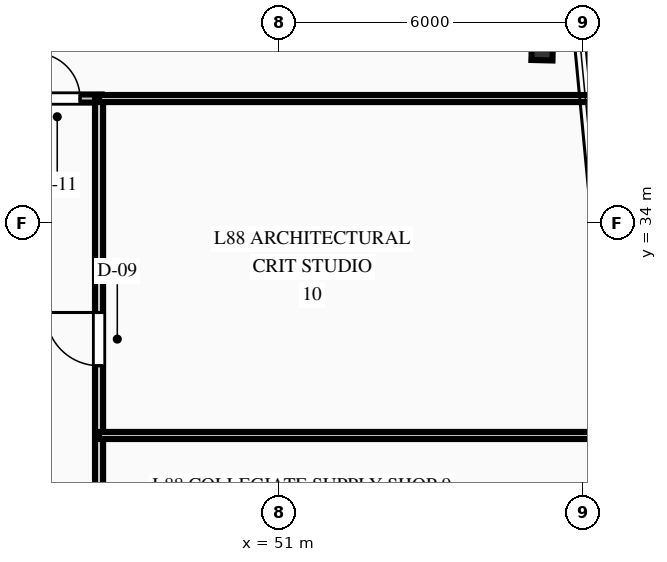
"""IFC4 building model, lengths in metres.
Left out: names, types, materials, properties, quantities, classifications, styles, units other than length and angle.
Written with IfcOpenShell. Run it as: python <this file> out.ifc"""

import sys

from ifc_helpers import new_model, si_unit, direction, frame, frame_2d, origin, origin_2d, place, context, subcontext, project, spatial, rectangle, i_section, extrude, element, fill, save


model = new_model("IFC4")
c1 = context("Model", 3, precision=1e-05, world=origin(), true_north=direction((0.0, 1.0)))
c2 = subcontext(c1, "Body", "Model", "MODEL_VIEW")
j1 = project(units=[si_unit("LENGTHUNIT", "METRE"), si_unit("PLANEANGLEUNIT", "RADIAN")], contexts=[c1])
p1 = place(None, origin())
s1 = spatial("IfcSite", under=j1, at=p1, CompositionType="ELEMENT")
p2 = place(p1, origin())
s2 = spatial("IfcBuilding", under=s1, at=p2, CompositionType="ELEMENT")
p3 = place(p2, frame((0.0, 0.0, 347.7)))
s3 = spatial("IfcBuildingStorey", under=s2, at=p3, CompositionType="ELEMENT", Elevation=347.7)
p4 = place(p3, frame((56.195, 37.409, 0.0), z_axis=(0.0, 0.0, 1.0), x_axis=(0.025304572866, 0.999679788028, 0.0)))
e1 = element("IfcColumn", 1, at=p4, inside=s3, PredefinedType="COLUMN", context=c2, shape_type="SweptSolid", body=[
    extrude(i_section(OverallWidth=0.406, OverallDepth=0.416, WebThickness=0.03, FlangeThickness=0.048, at=origin_2d()), origin(), (0.0, 0.0, 1.0), 4.5),
])
p5 = place(p3, frame((37.25, 36.45, 0.0), z_axis=(0.0, 0.0, 1.0), x_axis=(1.0, 0.0, 0.0)))
e2 = element("IfcWall", 2, at=p5, inside=s3, PredefinedType="PARTITIONING", context=c2, shape_type="SweptSolid", body=[
    extrude(rectangle(XDim=10.25, YDim=0.16, at=frame_2d((5.125, 0.0))), origin(), (0.0, 0.0, 1.0), 4.1),
])
p6 = place(p5, frame((4.365, 0.0, 0.0)))
e3 = element("IfcOpeningElement", 3, at=p6, cuts=e2, PredefinedType="OPENING", context=c2, shape_type="SweptSolid", body=[
    extrude(rectangle(XDim=1.05, YDim=2.15, at=frame_2d((0.525, 1.075))), frame((0.0, 0.09, 0.0), z_axis=(0.0, -1.0, 0.0), x_axis=(1.0, 0.0, 0.0)), (0.0, 0.0, 1.0), 0.18),
])
p7 = place(p5, frame((8.925, 0.0, 0.0)))
e4 = element("IfcOpeningElement", 4, at=p7, cuts=e2, PredefinedType="OPENING", context=c2, shape_type="SweptSolid", body=[
    extrude(rectangle(XDim=0.9, YDim=2.15, at=frame_2d((0.45, 1.075))), frame((0.0, 0.09, 0.0), z_axis=(0.0, -1.0, 0.0), x_axis=(1.0, 0.0, 0.0)), (0.0, 0.0, 1.0), 0.18),
])
p8 = place(p3, frame((47.45, 27.25, 0.0), z_axis=(0.0, 0.0, 1.0), x_axis=(0.0, 1.0, 0.0)))
e5 = element("IfcWall", 5, at=p8, inside=s3, PredefinedType="PARTITIONING", context=c2, shape_type="SweptSolid", body=[
    extrude(rectangle(XDim=9.2, YDim=0.16, at=frame_2d((4.6, 0.0))), origin(), (0.0, 0.0, 1.0), 4.1),
])
p9 = place(p8, frame((3.927, 0.0, 0.0)))
e6 = element("IfcOpeningElement", 6, at=p9, cuts=e5, PredefinedType="OPENING", context=c2, shape_type="SweptSolid", body=[
    extrude(rectangle(XDim=1.05, YDim=2.15, at=frame_2d((0.525, 1.075))), frame((0.0, 0.09, 0.0), z_axis=(0.0, -1.0, 0.0), x_axis=(1.0, 0.0, 0.0)), (0.0, 0.0, 1.0), 0.18),
])
p10 = place(p3, frame((47.45, 36.45, 0.0), z_axis=(0.0, 0.0, 1.0), x_axis=(1.0, 0.0, 0.0)))
e7 = element("IfcWall", 7, at=p10, inside=s3, PredefinedType="PARTITIONING", context=c2, shape_type="SweptSolid", body=[
    extrude(rectangle(XDim=9.738, YDim=0.14, at=frame_2d((4.869, 0.0))), origin(), (0.0, 0.0, 1.0), 3.478),
])
p11 = place(p3, frame((47.45, 29.8, 0.0), z_axis=(0.0, 0.0, 1.0), x_axis=(1.0, 0.0, 0.0)))
e8 = element("IfcWall", 8, at=p11, inside=s3, PredefinedType="PARTITIONING", context=c2, shape_type="SweptSolid", body=[
    extrude(rectangle(XDim=10.373, YDim=0.14, at=frame_2d((5.187, 0.0))), origin(), (0.0, 0.0, 1.0), 4.1),
])
p12 = place(p7, origin())
e9 = element("IfcDoor", 9, at=p12, inside=s3, OperationType="SINGLE_SWING_LEFT", PredefinedType="DOOR", context=c2, shape_type="SweptSolid", body=[
    extrude(rectangle(XDim=0.9, YDim=2.15, at=frame_2d((0.45, 1.075))), frame((0.0, 0.025, 0.0), z_axis=(0.0, -1.0, 0.0), x_axis=(1.0, 0.0, 0.0)), (0.0, 0.0, 1.0), 0.05),
])
fill(e4, e9)
p13 = place(p9, origin())
e10 = element("IfcDoor", 10, at=p13, inside=s3, OperationType="SINGLE_SWING_RIGHT", PredefinedType="DOOR", context=c2, shape_type="SweptSolid", body=[
    extrude(rectangle(XDim=1.05, YDim=2.15, at=frame_2d((0.525, 1.075))), frame((0.0, 0.025, 0.0), z_axis=(0.0, -1.0, 0.0), x_axis=(1.0, 0.0, 0.0)), (0.0, 0.0, 1.0), 0.05),
])
fill(e6, e10)
save(model, sys.argv[1])
